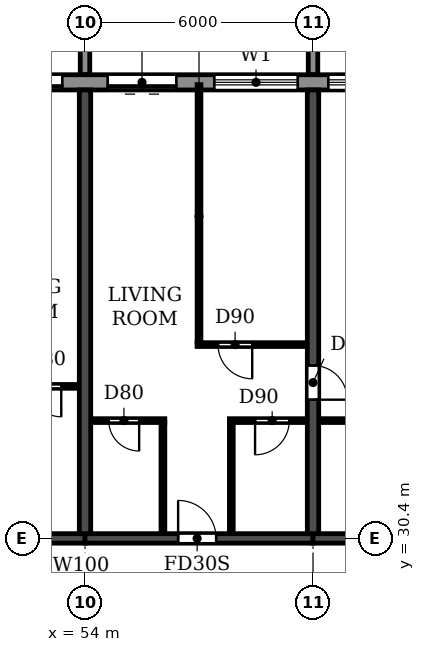
"""IFC4 building model, lengths in metres.
Left out: names, types, materials, properties, quantities, classifications, styles, units other than length and angle.
Written with IfcOpenShell. Run it as: python <this file> out.ifc"""

import sys

from ifc_helpers import new_model, si_unit, direction, frame, frame_2d, origin, place, context, subcontext, project, spatial, polyline, rectangle, outline, extrude, source, transform, mapped, element, fill, save


model = new_model("IFC4")
c1 = context("Model", 3, precision=1e-05, world=origin(), true_north=direction((0.0, 1.0)))
c2 = subcontext(c1, "Body", "Model", "MODEL_VIEW")
j1 = project(units=[si_unit("LENGTHUNIT", "METRE"), si_unit("PLANEANGLEUNIT", "RADIAN")], contexts=[c1])
p1 = place(None, origin())
s1 = spatial("IfcSite", under=j1, at=p1, CompositionType="ELEMENT")
p2 = place(p1, origin())
s2 = spatial("IfcBuilding", under=s1, at=p2, CompositionType="ELEMENT")
p3 = place(p2, frame((0.0, 0.0, 142.2)))
s3 = spatial("IfcBuildingStorey", under=s2, at=p3, CompositionType="ELEMENT", Elevation=142.2)
p4 = place(p3, frame((54.0, 30.525, 0.0), z_axis=(0.0, 0.0, 1.0), x_axis=(0.0, 1.0, 0.0)))
e1 = element("IfcWall", 1, at=p4, inside=s3, PredefinedType="SHEAR", context=c2, shape_type="SweptSolid", body=[
    extrude(rectangle(XDim=11.675, YDim=0.3, at=frame_2d((5.837, 0.0))), origin(), (0.0, 0.0, 1.0), 3.07),
])
p5 = place(p3, frame((60.0, 30.525, 0.0), z_axis=(0.0, 0.0, 1.0), x_axis=(0.0, 1.0, 0.0)))
e2 = element("IfcWall", 2, at=p5, inside=s3, PredefinedType="SHEAR", context=c2, shape_type="SweptSolid", body=[
    extrude(rectangle(XDim=11.675, YDim=0.3, at=frame_2d((5.837, 0.0))), origin(), (0.0, 0.0, 1.0), 3.07),
])
p6 = place(p5, frame((3.525, 0.0, 0.0)))
e3 = element("IfcOpeningElement", 3, at=p6, cuts=e2, PredefinedType="OPENING", context=c2, shape_type="SweptSolid", body=[
    extrude(rectangle(XDim=0.9, YDim=2.1, at=frame_2d((0.45, 1.05))), frame((0.0, 0.16, 0.0), z_axis=(0.0, -1.0, 0.0), x_axis=(1.0, 0.0, 0.0)), (0.0, 0.0, 1.0), 0.32),
])
p7 = place(p3, frame((48.0, 30.4, 0.0), z_axis=(0.0, 0.0, 1.0), x_axis=(1.0, 0.0, 0.0)))
e4 = element("IfcWall", 4, at=p7, inside=s3, PredefinedType="SHEAR", context=c2, shape_type="SweptSolid", body=[
    extrude(rectangle(XDim=6.0, YDim=0.25, at=frame_2d((3.0, 0.0))), origin(), (0.0, 0.0, 1.0), 2.47),
])
p8 = place(p7, frame((2.55, 0.0, 0.0)))
e5 = element("IfcOpeningElement", 5, at=p8, cuts=e4, PredefinedType="OPENING", context=c2, shape_type="SweptSolid", body=[
    extrude(rectangle(XDim=1.0, YDim=2.1, at=frame_2d((0.5, 1.05))), frame((0.0, 0.135, 0.0), z_axis=(0.0, -1.0, 0.0), x_axis=(1.0, 0.0, 0.0)), (0.0, 0.0, 1.0), 0.27),
])
p9 = place(p3, frame((54.0, 30.4, 0.0), z_axis=(0.0, 0.0, 1.0), x_axis=(1.0, 0.0, 0.0)))
e6 = element("IfcWall", 6, at=p9, inside=s3, PredefinedType="SHEAR", context=c2, shape_type="SweptSolid", body=[
    extrude(rectangle(XDim=6.0, YDim=0.25, at=frame_2d((3.0, 0.0))), origin(), (0.0, 0.0, 1.0), 2.47),
])
p10 = place(p9, frame((2.45, 0.0, 0.0)))
e7 = element("IfcOpeningElement", 7, at=p10, cuts=e6, PredefinedType="OPENING", context=c2, shape_type="SweptSolid", body=[
    extrude(rectangle(XDim=1.0, YDim=2.1, at=frame_2d((0.5, 1.05))), frame((0.0, 0.135, 0.0), z_axis=(0.0, -1.0, 0.0), x_axis=(1.0, 0.0, 0.0)), (0.0, 0.0, 1.0), 0.27),
])
p11 = place(p3, frame((60.0, 30.4, 0.0), z_axis=(0.0, 0.0, 1.0), x_axis=(1.0, 0.0, 0.0)))
e8 = element("IfcWall", 8, at=p11, inside=s3, PredefinedType="SHEAR", context=c2, shape_type="SweptSolid", body=[
    extrude(rectangle(XDim=6.0, YDim=0.25, at=frame_2d((3.0, 0.0))), origin(), (0.0, 0.0, 1.0), 2.47),
])
p12 = place(p3, frame((85.317, 42.4, 0.0), z_axis=(0.0, 0.0, 1.0), x_axis=(-1.0, 0.0, 0.0)))
e9 = element("IfcWall", 9, at=p12, inside=s3, PredefinedType="STANDARD", context=c2, shape_type="SweptSolid", body=[
    extrude(rectangle(XDim=68.634, YDim=0.4, at=frame_2d((34.317, 0.0))), origin(), (0.0, 0.0, 1.0), 3.07),
])
p13 = place(p12, frame((64.717, 0.0, 0.9)))
e10 = element("IfcOpeningElement", 10, at=p13, cuts=e9, PredefinedType="OPENING", context=c2, shape_type="SweptSolid", body=[
    extrude(rectangle(XDim=2.2, YDim=1.5, at=frame_2d((1.1, 0.75))), frame((0.0, 0.21, 0.0), z_axis=(0.0, -1.0, 0.0), x_axis=(1.0, 0.0, 0.0)), (0.0, 0.0, 1.0), 0.42),
])
p14 = place(p12, frame((61.917, 0.0, 0.0)))
e11 = element("IfcOpeningElement", 11, at=p14, cuts=e9, PredefinedType="OPENING", context=c2, shape_type="SweptSolid", body=[
    extrude(rectangle(XDim=1.8, YDim=2.4, at=frame_2d((0.9, 1.2))), frame((0.0, 0.21, 0.0), z_axis=(0.0, -1.0, 0.0), x_axis=(1.0, 0.0, 0.0)), (0.0, 0.0, 1.0), 0.42),
])
p15 = place(p12, frame((58.717, 0.0, 0.9)))
e12 = element("IfcOpeningElement", 12, at=p15, cuts=e9, PredefinedType="OPENING", context=c2, shape_type="SweptSolid", body=[
    extrude(rectangle(XDim=2.2, YDim=1.5, at=frame_2d((1.1, 0.75))), frame((0.0, 0.21, 0.0), z_axis=(0.0, -1.0, 0.0), x_axis=(1.0, 0.0, 0.0)), (0.0, 0.0, 1.0), 0.42),
])
p16 = place(p12, frame((55.917, 0.0, 0.0)))
e13 = element("IfcOpeningElement", 13, at=p16, cuts=e9, PredefinedType="OPENING", context=c2, shape_type="SweptSolid", body=[
    extrude(rectangle(XDim=1.8, YDim=2.4, at=frame_2d((0.9, 1.2))), frame((0.0, 0.21, 0.0), z_axis=(0.0, -1.0, 0.0), x_axis=(1.0, 0.0, 0.0)), (0.0, 0.0, 1.0), 0.42),
])
p17 = place(p12, frame((52.717, 0.0, 0.9)))
e14 = element("IfcOpeningElement", 14, at=p17, cuts=e9, PredefinedType="OPENING", context=c2, shape_type="SweptSolid", body=[
    extrude(rectangle(XDim=2.2, YDim=1.5, at=frame_2d((1.1, 0.75))), frame((0.0, 0.21, 0.0), z_axis=(0.0, -1.0, 0.0), x_axis=(1.0, 0.0, 0.0)), (0.0, 0.0, 1.0), 0.42),
])
p18 = place(p12, frame((49.717, 0.0, 0.9)))
e15 = element("IfcOpeningElement", 15, at=p18, cuts=e9, PredefinedType="OPENING", context=c2, shape_type="SweptSolid", body=[
    extrude(rectangle(XDim=2.2, YDim=1.5, at=frame_2d((1.1, 0.75))), frame((0.0, 0.21, 0.0), z_axis=(0.0, -1.0, 0.0), x_axis=(1.0, 0.0, 0.0)), (0.0, 0.0, 1.0), 0.42),
])
p19 = place(p12, frame((46.917, 0.0, 0.0)))
e16 = element("IfcOpeningElement", 16, at=p19, cuts=e9, PredefinedType="OPENING", context=c2, shape_type="SweptSolid", body=[
    extrude(rectangle(XDim=1.8, YDim=2.4, at=frame_2d((0.9, 1.2))), frame((0.0, 0.21, 0.0), z_axis=(0.0, -1.0, 0.0), x_axis=(1.0, 0.0, 0.0)), (0.0, 0.0, 1.0), 0.42),
])
p20 = place(p12, frame((43.717, 0.0, 0.9)))
e17 = element("IfcOpeningElement", 17, at=p20, cuts=e9, PredefinedType="OPENING", context=c2, shape_type="SweptSolid", body=[
    extrude(rectangle(XDim=2.2, YDim=1.5, at=frame_2d((1.1, 0.75))), frame((0.0, 0.21, 0.0), z_axis=(0.0, -1.0, 0.0), x_axis=(1.0, 0.0, 0.0)), (0.0, 0.0, 1.0), 0.42),
])
p21 = place(p12, frame((40.717, 0.0, 0.9)))
e18 = element("IfcOpeningElement", 18, at=p21, cuts=e9, PredefinedType="OPENING", context=c2, shape_type="SweptSolid", body=[
    extrude(rectangle(XDim=2.2, YDim=1.5, at=frame_2d((1.1, 0.75))), frame((0.0, 0.21, 0.0), z_axis=(0.0, -1.0, 0.0), x_axis=(1.0, 0.0, 0.0)), (0.0, 0.0, 1.0), 0.42),
])
p22 = place(p12, frame((37.717, 0.0, 0.9)))
e19 = element("IfcOpeningElement", 19, at=p22, cuts=e9, PredefinedType="OPENING", context=c2, shape_type="SweptSolid", body=[
    extrude(rectangle(XDim=2.2, YDim=1.5, at=frame_2d((1.1, 0.75))), frame((0.0, 0.21, 0.0), z_axis=(0.0, -1.0, 0.0), x_axis=(1.0, 0.0, 0.0)), (0.0, 0.0, 1.0), 0.42),
])
p23 = place(p12, frame((34.717, 0.0, 0.9)))
e20 = element("IfcOpeningElement", 20, at=p23, cuts=e9, PredefinedType="OPENING", context=c2, shape_type="SweptSolid", body=[
    extrude(rectangle(XDim=2.2, YDim=1.5, at=frame_2d((1.1, 0.75))), frame((0.0, 0.21, 0.0), z_axis=(0.0, -1.0, 0.0), x_axis=(1.0, 0.0, 0.0)), (0.0, 0.0, 1.0), 0.42),
])
p24 = place(p12, frame((31.917, 0.0, 0.0)))
e21 = element("IfcOpeningElement", 21, at=p24, cuts=e9, PredefinedType="OPENING", context=c2, shape_type="SweptSolid", body=[
    extrude(rectangle(XDim=1.8, YDim=2.4, at=frame_2d((0.9, 1.2))), frame((0.0, 0.21, 0.0), z_axis=(0.0, -1.0, 0.0), x_axis=(1.0, 0.0, 0.0)), (0.0, 0.0, 1.0), 0.42),
])
p25 = place(p12, frame((28.917, 0.0, 0.0)))
e22 = element("IfcOpeningElement", 22, at=p25, cuts=e9, PredefinedType="OPENING", context=c2, shape_type="SweptSolid", body=[
    extrude(rectangle(XDim=1.8, YDim=2.4, at=frame_2d((0.9, 1.2))), frame((0.0, 0.21, 0.0), z_axis=(0.0, -1.0, 0.0), x_axis=(1.0, 0.0, 0.0)), (0.0, 0.0, 1.0), 0.42),
])
p26 = place(p12, frame((25.717, 0.0, 0.9)))
e23 = element("IfcOpeningElement", 23, at=p26, cuts=e9, PredefinedType="OPENING", context=c2, shape_type="SweptSolid", body=[
    extrude(rectangle(XDim=2.2, YDim=1.5, at=frame_2d((1.1, 0.75))), frame((0.0, 0.21, 0.0), z_axis=(0.0, -1.0, 0.0), x_axis=(1.0, 0.0, 0.0)), (0.0, 0.0, 1.0), 0.42),
])
p27 = place(p12, frame((22.717, 0.0, 0.9)))
e24 = element("IfcOpeningElement", 24, at=p27, cuts=e9, PredefinedType="OPENING", context=c2, shape_type="SweptSolid", body=[
    extrude(rectangle(XDim=2.2, YDim=1.5, at=frame_2d((1.1, 0.75))), frame((0.0, 0.21, 0.0), z_axis=(0.0, -1.0, 0.0), x_axis=(1.0, 0.0, 0.0)), (0.0, 0.0, 1.0), 0.42),
])
p28 = place(p12, frame((19.717, 0.0, 0.9)))
e25 = element("IfcOpeningElement", 25, at=p28, cuts=e9, PredefinedType="OPENING", context=c2, shape_type="SweptSolid", body=[
    extrude(rectangle(XDim=2.2, YDim=1.5, at=frame_2d((1.1, 0.75))), frame((0.0, 0.21, 0.0), z_axis=(0.0, -1.0, 0.0), x_axis=(1.0, 0.0, 0.0)), (0.0, 0.0, 1.0), 0.42),
])
p29 = place(p12, frame((16.717, 0.0, 0.9)))
e26 = element("IfcOpeningElement", 26, at=p29, cuts=e9, PredefinedType="OPENING", context=c2, shape_type="SweptSolid", body=[
    extrude(rectangle(XDim=2.2, YDim=1.5, at=frame_2d((1.1, 0.75))), frame((0.0, 0.21, 0.0), z_axis=(0.0, -1.0, 0.0), x_axis=(1.0, 0.0, 0.0)), (0.0, 0.0, 1.0), 0.42),
])
p30 = place(p12, frame((13.917, 0.0, 0.0)))
e27 = element("IfcOpeningElement", 27, at=p30, cuts=e9, PredefinedType="OPENING", context=c2, shape_type="SweptSolid", body=[
    extrude(rectangle(XDim=1.8, YDim=2.4, at=frame_2d((0.9, 1.2))), frame((0.0, 0.21, 0.0), z_axis=(0.0, -1.0, 0.0), x_axis=(1.0, 0.0, 0.0)), (0.0, 0.0, 1.0), 0.42),
])
p31 = place(p12, frame((10.917, 0.0, 0.0)))
e28 = element("IfcOpeningElement", 28, at=p31, cuts=e9, PredefinedType="OPENING", context=c2, shape_type="SweptSolid", body=[
    extrude(rectangle(XDim=1.8, YDim=2.4, at=frame_2d((0.9, 1.2))), frame((0.0, 0.21, 0.0), z_axis=(0.0, -1.0, 0.0), x_axis=(1.0, 0.0, 0.0)), (0.0, 0.0, 1.0), 0.42),
])
p32 = place(p12, frame((7.717, 0.0, 0.9)))
e29 = element("IfcOpeningElement", 29, at=p32, cuts=e9, PredefinedType="OPENING", context=c2, shape_type="SweptSolid", body=[
    extrude(rectangle(XDim=2.2, YDim=1.5, at=frame_2d((1.1, 0.75))), frame((0.0, 0.21, 0.0), z_axis=(0.0, -1.0, 0.0), x_axis=(1.0, 0.0, 0.0)), (0.0, 0.0, 1.0), 0.42),
])
p33 = place(p12, frame((4.717, 0.0, 0.9)))
e30 = element("IfcOpeningElement", 30, at=p33, cuts=e9, PredefinedType="OPENING", context=c2, shape_type="SweptSolid", body=[
    extrude(rectangle(XDim=2.2, YDim=1.5, at=frame_2d((1.1, 0.75))), frame((0.0, 0.21, 0.0), z_axis=(0.0, -1.0, 0.0), x_axis=(1.0, 0.0, 0.0)), (0.0, 0.0, 1.0), 0.42),
])
p34 = place(p12, frame((1.917, 0.0, 0.0)))
e31 = element("IfcOpeningElement", 31, at=p34, cuts=e9, PredefinedType="OPENING", context=c2, shape_type="SweptSolid", body=[
    extrude(rectangle(XDim=1.8, YDim=2.4, at=frame_2d((0.9, 1.2))), frame((0.0, 0.21, 0.0), z_axis=(0.0, -1.0, 0.0), x_axis=(1.0, 0.0, 0.0)), (0.0, 0.0, 1.0), 0.42),
])
m1 = source(origin(), c2, "Body", "SweptSolid", [
    extrude(outline(polyline([(0.0, 0.0), (0.25, 0.0), (0.25, 3.1), (0.0, 3.1), (0.0, 0.0)])), origin(), (0.0, 0.0, 1.0), 3.1),
])
for number, where in (
    (32, (53.875, 42.6, 0.0)),
    (33, (59.875, 42.6, 0.0)),
):
    element("IfcWall", number, at=place(p3, frame(where)), inside=s3, PredefinedType="STANDARD", context=c2, shape_type="MappedRepresentation", body=[
        mapped(m1, transform((0.0, 0.0, 0.0))),
    ])
p35 = place(p3, frame((54.16, 33.5, 0.0), z_axis=(0.0, 0.0, 1.0), x_axis=(1.0, 0.0, 0.0)))
e34 = element("IfcWall", 34, at=p35, inside=s3, PredefinedType="PARTITIONING", context=c2, shape_type="SweptSolid", body=[
    extrude(rectangle(XDim=1.94, YDim=0.1, at=frame_2d((0.97, 0.0))), origin(), (0.0, 0.0, 1.0), 3.07),
])
p36 = place(p35, frame((0.465, 0.0, 0.0)))
e35 = element("IfcOpeningElement", 35, at=p36, cuts=e34, PredefinedType="OPENING", context=c2, shape_type="SweptSolid", body=[
    extrude(rectangle(XDim=0.8, YDim=2.1, at=frame_2d((0.4, 1.05))), frame((0.0, 0.06, 0.0), z_axis=(0.0, -1.0, 0.0), x_axis=(1.0, 0.0, 0.0)), (0.0, 0.0, 1.0), 0.12),
])
p37 = place(p3, frame((57.8, 33.5, 0.0), z_axis=(0.0, 0.0, 1.0), x_axis=(1.0, 0.0, 0.0)))
e36 = element("IfcWall", 36, at=p37, inside=s3, PredefinedType="PARTITIONING", context=c2, shape_type="SweptSolid", body=[
    extrude(rectangle(XDim=2.04, YDim=0.1, at=frame_2d((1.02, 0.0))), origin(), (0.0, 0.0, 1.0), 3.07),
])
p38 = place(p37, frame((0.675, 0.0, 0.0)))
e37 = element("IfcOpeningElement", 37, at=p38, cuts=e36, PredefinedType="OPENING", context=c2, shape_type="SweptSolid", body=[
    extrude(rectangle(XDim=0.9, YDim=2.1, at=frame_2d((0.45, 1.05))), frame((0.0, 0.06, 0.0), z_axis=(0.0, -1.0, 0.0), x_axis=(1.0, 0.0, 0.0)), (0.0, 0.0, 1.0), 0.12),
])
p39 = place(p3, frame((60.16, 33.5, 0.0), z_axis=(0.0, 0.0, 1.0), x_axis=(1.0, 0.0, 0.0)))
e38 = element("IfcWall", 38, at=p39, inside=s3, PredefinedType="PARTITIONING", context=c2, shape_type="SweptSolid", body=[
    extrude(rectangle(XDim=2.74, YDim=0.1, at=frame_2d((1.37, 0.0))), origin(), (0.0, 0.0, 1.0), 3.07),
])
p40 = place(p39, frame((0.94, 0.0, 0.0)))
e39 = element("IfcOpeningElement", 39, at=p40, cuts=e38, PredefinedType="OPENING", context=c2, shape_type="SweptSolid", body=[
    extrude(rectangle(XDim=0.8, YDim=2.1, at=frame_2d((0.4, 1.05))), frame((0.0, 0.06, 0.0), z_axis=(0.0, -1.0, 0.0), x_axis=(1.0, 0.0, 0.0)), (0.0, 0.0, 1.0), 0.12),
])
p41 = place(p3, frame((51.9, 34.4, 0.0), z_axis=(0.0, 0.0, 1.0), x_axis=(1.0, 0.0, 0.0)))
e40 = element("IfcWall", 40, at=p41, inside=s3, PredefinedType="PARTITIONING", context=c2, shape_type="SweptSolid", body=[
    extrude(rectangle(XDim=1.94, YDim=0.1, at=frame_2d((0.97, 0.0))), origin(), (0.0, 0.0, 1.0), 3.07),
])
p42 = place(p41, frame((0.675, 0.0, 0.0)))
e41 = element("IfcOpeningElement", 41, at=p42, cuts=e40, PredefinedType="OPENING", context=c2, shape_type="SweptSolid", body=[
    extrude(rectangle(XDim=0.8, YDim=2.1, at=frame_2d((0.4, 1.05))), frame((0.0, 0.06, 0.0), z_axis=(0.0, -1.0, 0.0), x_axis=(1.0, 0.0, 0.0)), (0.0, 0.0, 1.0), 0.12),
])
p43 = place(p3, frame((56.95, 35.5, 0.0), z_axis=(0.0, 0.0, 1.0), x_axis=(1.0, 0.0, 0.0)))
e42 = element("IfcWall", 42, at=p43, inside=s3, PredefinedType="PARTITIONING", context=c2, shape_type="SweptSolid", body=[
    extrude(rectangle(XDim=2.89, YDim=0.1, at=frame_2d((1.445, 0.0))), origin(), (0.0, 0.0, 1.0), 3.07),
])
p44 = place(p43, frame((0.55, 0.0, 0.0)))
e43 = element("IfcOpeningElement", 43, at=p44, cuts=e42, PredefinedType="OPENING", context=c2, shape_type="SweptSolid", body=[
    extrude(rectangle(XDim=0.9, YDim=2.1, at=frame_2d((0.45, 1.05))), frame((0.0, 0.06, 0.0), z_axis=(0.0, -1.0, 0.0), x_axis=(1.0, 0.0, 0.0)), (0.0, 0.0, 1.0), 0.12),
])
p45 = place(p3, frame((56.05, 30.535, 0.0), z_axis=(0.0, 0.0, 1.0), x_axis=(0.0, 1.0, 0.0)))
e44 = element("IfcWall", 44, at=p45, inside=s3, PredefinedType="PARTITIONING", context=c2, shape_type="SweptSolid", body=[
    extrude(rectangle(XDim=2.915, YDim=0.1, at=frame_2d((1.458, 0.0))), origin(), (0.0, 0.0, 1.0), 3.07),
])
p46 = place(p3, frame((57.0, 35.55, 0.0), z_axis=(0.0, 0.0, 1.0), x_axis=(0.0, 1.0, 0.0)))
e45 = element("IfcWall", 45, at=p46, inside=s3, PredefinedType="PARTITIONING", context=c2, shape_type="SweptSolid", body=[
    extrude(rectangle(XDim=6.79, YDim=0.1, at=frame_2d((3.395, 0.0))), origin(), (0.0, 0.0, 1.0), 3.07),
])
p47 = place(p3, frame((57.85, 30.535, 0.0), z_axis=(0.0, 0.0, 1.0), x_axis=(0.0, 1.0, 0.0)))
e46 = element("IfcWall", 46, at=p47, inside=s3, PredefinedType="PARTITIONING", context=c2, shape_type="SweptSolid", body=[
    extrude(rectangle(XDim=2.915, YDim=0.1, at=frame_2d((1.458, 0.0))), origin(), (0.0, 0.0, 1.0), 3.07),
])
p48 = place(p24, origin())
e47 = element("IfcDoor", 47, at=p48, inside=s3, OperationType="DOUBLE_DOOR_SLIDING", PredefinedType="DOOR", context=c2, shape_type="SweptSolid", body=[
    extrude(rectangle(XDim=1.8, YDim=2.4, at=frame_2d((0.9, 1.2))), frame((0.0, 0.025, 0.0), z_axis=(0.0, -1.0, 0.0), x_axis=(1.0, 0.0, 0.0)), (0.0, 0.0, 1.0), 0.05),
])
fill(e21, e47)
p49 = place(p25, origin())
e48 = element("IfcDoor", 48, at=p49, inside=s3, OperationType="DOUBLE_DOOR_SLIDING", PredefinedType="DOOR", context=c2, shape_type="SweptSolid", body=[
    extrude(rectangle(XDim=1.8, YDim=2.4, at=frame_2d((0.9, 1.2))), frame((0.0, 0.025, 0.0), z_axis=(0.0, -1.0, 0.0), x_axis=(1.0, 0.0, 0.0)), (0.0, 0.0, 1.0), 0.05),
])
fill(e22, e48)
p50 = place(p26, origin())
e49 = element("IfcWindow", 49, at=p50, inside=s3, PartitioningType="DOUBLE_PANEL_HORIZONTAL", PredefinedType="WINDOW", context=c2, shape_type="SweptSolid", body=[
    extrude(rectangle(XDim=2.2, YDim=1.5, at=frame_2d((1.1, 0.75))), frame((0.0, 0.03, 0.0), z_axis=(0.0, -1.0, 0.0), x_axis=(1.0, 0.0, 0.0)), (0.0, 0.0, 1.0), 0.06),
])
fill(e23, e49)
p51 = place(p27, origin())
e50 = element("IfcWindow", 50, at=p51, inside=s3, PartitioningType="DOUBLE_PANEL_HORIZONTAL", PredefinedType="WINDOW", context=c2, shape_type="SweptSolid", body=[
    extrude(rectangle(XDim=2.2, YDim=1.5, at=frame_2d((1.1, 0.75))), frame((0.0, 0.03, 0.0), z_axis=(0.0, -1.0, 0.0), x_axis=(1.0, 0.0, 0.0)), (0.0, 0.0, 1.0), 0.06),
])
fill(e24, e50)
p52 = place(p42, frame((0.8, 0.0, 0.0), z_axis=(0.0, 0.0, 1.0), x_axis=(-1.0, 0.0, 0.0)))
e51 = element("IfcDoor", 51, at=p52, inside=s3, OperationType="SINGLE_SWING_LEFT", PredefinedType="DOOR", context=c2, shape_type="SweptSolid", body=[
    extrude(rectangle(XDim=0.8, YDim=2.1, at=frame_2d((0.4, 1.05))), frame((0.0, 0.025, 0.0), z_axis=(0.0, -1.0, 0.0), x_axis=(1.0, 0.0, 0.0)), (0.0, 0.0, 1.0), 0.05),
])
fill(e41, e51)
p53 = place(p36, frame((0.8, 0.0, 0.0), z_axis=(0.0, 0.0, 1.0), x_axis=(-1.0, 0.0, 0.0)))
e52 = element("IfcDoor", 52, at=p53, inside=s3, OperationType="SINGLE_SWING_LEFT", PredefinedType="DOOR", context=c2, shape_type="SweptSolid", body=[
    extrude(rectangle(XDim=0.8, YDim=2.1, at=frame_2d((0.4, 1.05))), frame((0.0, 0.025, 0.0), z_axis=(0.0, -1.0, 0.0), x_axis=(1.0, 0.0, 0.0)), (0.0, 0.0, 1.0), 0.05),
])
fill(e35, e52)
p54 = place(p10, origin())
e53 = element("IfcDoor", 53, at=p54, inside=s3, OperationType="SINGLE_SWING_LEFT", PredefinedType="DOOR", context=c2, shape_type="SweptSolid", body=[
    extrude(rectangle(XDim=1.0, YDim=2.1, at=frame_2d((0.5, 1.05))), frame((0.0, 0.025, 0.0), z_axis=(0.0, -1.0, 0.0), x_axis=(1.0, 0.0, 0.0)), (0.0, 0.0, 1.0), 0.05),
])
fill(e7, e53)
p55 = place(p44, frame((0.9, 0.0, 0.0), z_axis=(0.0, 0.0, 1.0), x_axis=(-1.0, 0.0, 0.0)))
e54 = element("IfcDoor", 54, at=p55, inside=s3, OperationType="SINGLE_SWING_LEFT", PredefinedType="DOOR", context=c2, shape_type="SweptSolid", body=[
    extrude(rectangle(XDim=0.9, YDim=2.1, at=frame_2d((0.45, 1.05))), frame((0.0, 0.025, 0.0), z_axis=(0.0, -1.0, 0.0), x_axis=(1.0, 0.0, 0.0)), (0.0, 0.0, 1.0), 0.05),
])
fill(e43, e54)
p56 = place(p38, frame((0.9, 0.0, 0.0), z_axis=(0.0, 0.0, 1.0), x_axis=(-1.0, 0.0, 0.0)))
e55 = element("IfcDoor", 55, at=p56, inside=s3, OperationType="SINGLE_SWING_RIGHT", PredefinedType="DOOR", context=c2, shape_type="SweptSolid", body=[
    extrude(rectangle(XDim=0.9, YDim=2.1, at=frame_2d((0.45, 1.05))), frame((0.0, 0.025, 0.0), z_axis=(0.0, -1.0, 0.0), x_axis=(1.0, 0.0, 0.0)), (0.0, 0.0, 1.0), 0.05),
])
fill(e37, e55)
p57 = place(p6, frame((0.9, 0.0, 0.0), z_axis=(0.0, 0.0, 1.0), x_axis=(-1.0, 0.0, 0.0)))
e56 = element("IfcDoor", 56, at=p57, inside=s3, OperationType="SINGLE_SWING_RIGHT", PredefinedType="DOOR", context=c2, shape_type="SweptSolid", body=[
    extrude(rectangle(XDim=0.9, YDim=2.1, at=frame_2d((0.45, 1.05))), frame((0.0, 0.025, 0.0), z_axis=(0.0, -1.0, 0.0), x_axis=(1.0, 0.0, 0.0)), (0.0, 0.0, 1.0), 0.05),
])
fill(e3, e56)
save(model, sys.argv[1])
